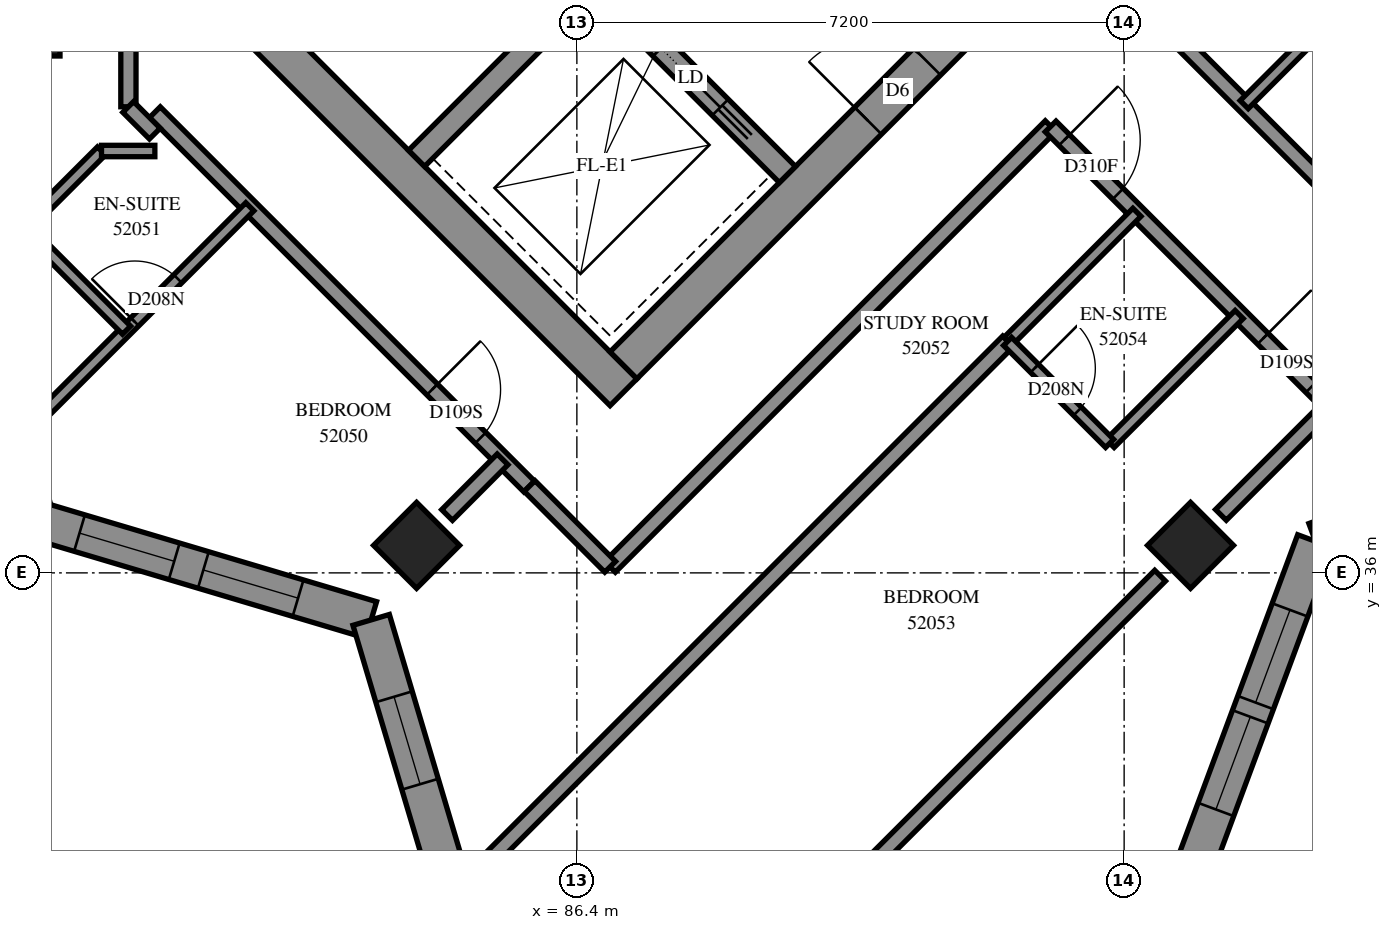
"""IFC4 building model, lengths in metres.
Left out: names, types, materials, properties, quantities, classifications, styles, units other than length and angle.
Written with IfcOpenShell. Run it as: python <this file> out.ifc"""

import sys

from ifc_helpers import new_model, si_unit, direction, frame, frame_2d, origin, origin_2d, place, context, subcontext, project, spatial, polyline, rectangle, outline, extrude, element, fill, save


model = new_model("IFC4")
c1 = context("Model", 3, precision=1e-05, world=origin(), true_north=direction((0.0, 1.0)))
c2 = subcontext(c1, "Body", "Model", "MODEL_VIEW")
j1 = project(units=[si_unit("LENGTHUNIT", "METRE"), si_unit("PLANEANGLEUNIT", "RADIAN")], contexts=[c1])
p1 = place(None, origin())
s1 = spatial("IfcSite", under=j1, at=p1, CompositionType="ELEMENT")
p2 = place(p1, origin())
s2 = spatial("IfcBuilding", under=s1, at=p2, CompositionType="ELEMENT")
p3 = place(p2, frame((0.0, 0.0, 193.0)))
s3 = spatial("IfcBuildingStorey", under=s2, at=p3, CompositionType="ELEMENT", Elevation=193.0)
for number, where, z_axis, x_axis in (
    (1, (79.2, 43.2, 0.0), (0.0, 0.0, 1.0), (1.0, 0.0, 0.0)),
    (2, (84.291, 36.362, 0.0), (0.0, 0.0, 1.0), (0.707, -0.707, 0.0)),
    (3, (94.474, 36.362, 0.0), (0.0, 0.0, 1.0), (0.707, -0.707, 0.0)),
):
    element("IfcColumn", number, at=place(p3, frame(where, z_axis=z_axis, x_axis=x_axis)), inside=s3, PredefinedType="COLUMN", context=c2, shape_type="SweptSolid", body=[
        extrude(rectangle(XDim=0.8, YDim=0.8, at=origin_2d()), origin(), (0.0, 0.0, 1.0), 3.1),
    ])
p4 = place(p3, frame((76.124, 49.267, -0.3), z_axis=(0.0, 0.0, 1.0), x_axis=(0.7071067812, -0.7071067812, 0.0)))
e4 = element("IfcWall", 4, at=p4, inside=s3, PredefinedType="SHEAR", context=c2, shape_type="SweptSolid", body=[
    extrude(rectangle(XDim=15.4, YDim=0.5, at=frame_2d((7.7, 0.0))), origin(), (0.0, 0.0, 1.0), 2.7),
])
p5 = place(p3, frame((87.013, 38.731, -0.3), z_axis=(0.0, 0.0, 1.0), x_axis=(0.7071067812, 0.7071067812, 0.0)))
e5 = element("IfcWall", 5, at=p5, inside=s3, PredefinedType="SHEAR", context=c2, shape_type="SweptSolid", body=[
    extrude(rectangle(XDim=14.4, YDim=0.5, at=frame_2d((7.2, 0.0))), origin(), (0.0, 0.0, 1.0), 2.7),
])
p6 = place(p5, frame((4.55, 0.0, 0.3)))
e6 = element("IfcOpeningElement", 6, at=p6, cuts=e5, PredefinedType="OPENING", context=c2, shape_type="SweptSolid", body=[
    extrude(rectangle(XDim=1.1, YDim=2.1, at=frame_2d((0.55, 1.05))), frame((0.0, 0.26, 0.0), z_axis=(0.0, -1.0, 0.0), x_axis=(1.0, 0.0, 0.0)), (0.0, 0.0, 1.0), 0.52),
])
p7 = place(p5, frame((11.35, 0.0, 0.3)))
e7 = element("IfcOpeningElement", 7, at=p7, cuts=e5, PredefinedType="OPENING", context=c2, shape_type="SweptSolid", body=[
    extrude(rectangle(XDim=1.1, YDim=2.1, at=frame_2d((0.55, 1.05))), frame((0.0, 0.26, 0.0), z_axis=(0.0, -1.0, 0.0), x_axis=(1.0, 0.0, 0.0)), (0.0, 0.0, 1.0), 0.52),
])
p8 = place(p3, frame((84.291, 41.453, 0.0), z_axis=(0.0, 0.0, 1.0), x_axis=(0.7071067812, 0.7071067812, 0.0)))
e8 = element("IfcWall", 8, at=p8, inside=s3, PredefinedType="SOLIDWALL", context=c2, shape_type="SweptSolid", body=[
    extrude(rectangle(XDim=3.3, YDim=0.3, at=frame_2d((1.65, 0.0))), origin(), (0.0, 0.0, 1.0), 3.1),
])
p9 = place(p3, frame((78.988, 51.423, 0.0), z_axis=(0.0, 0.0, 1.0), x_axis=(0.7071067812, -0.7071067812, 0.0)))
e9 = element("IfcWall", 9, at=p9, inside=s3, PredefinedType="SOLIDWALL", context=c2, shape_type="SweptSolid", body=[
    extrude(rectangle(XDim=14.4, YDim=0.3, at=frame_2d((7.2, 0.0))), origin(), (0.0, 0.0, 1.0), 3.1),
])
p10 = place(p9, frame((1.35, 0.0, 0.0)))
e10 = element("IfcOpeningElement", 10, at=p10, cuts=e9, PredefinedType="OPENING", context=c2, shape_type="SweptSolid", body=[
    extrude(rectangle(XDim=0.9, YDim=2.1, at=frame_2d((0.45, 1.05))), frame((0.0, 0.16, 0.0), z_axis=(0.0, -1.0, 0.0), x_axis=(1.0, 0.0, 0.0)), (0.0, 0.0, 1.0), 0.32),
])
p11 = place(p9, frame((4.95, 0.0, 0.0)))
e11 = element("IfcOpeningElement", 11, at=p11, cuts=e9, PredefinedType="OPENING", context=c2, shape_type="SweptSolid", body=[
    extrude(rectangle(XDim=0.9, YDim=2.1, at=frame_2d((0.45, 1.05))), frame((0.0, 0.16, 0.0), z_axis=(0.0, -1.0, 0.0), x_axis=(1.0, 0.0, 0.0)), (0.0, 0.0, 1.0), 0.32),
])
p12 = place(p9, frame((8.55, 0.0, 0.0)))
e12 = element("IfcOpeningElement", 12, at=p12, cuts=e9, PredefinedType="OPENING", context=c2, shape_type="SweptSolid", body=[
    extrude(rectangle(XDim=0.9, YDim=2.1, at=frame_2d((0.45, 1.05))), frame((0.0, 0.16, 0.0), z_axis=(0.0, -1.0, 0.0), x_axis=(1.0, 0.0, 0.0)), (0.0, 0.0, 1.0), 0.32),
])
p13 = place(p9, frame((12.05, 0.0, 0.0)))
e13 = element("IfcOpeningElement", 13, at=p13, cuts=e9, PredefinedType="OPENING", context=c2, shape_type="SweptSolid", body=[
    extrude(rectangle(XDim=1.1, YDim=2.1, at=frame_2d((0.55, 1.05))), frame((0.0, 0.16, 0.0), z_axis=(0.0, -1.0, 0.0), x_axis=(1.0, 0.0, 0.0)), (0.0, 0.0, 1.0), 0.32),
])
p14 = place(p3, frame((94.281, 31.47, 0.0), z_axis=(0.0, 0.0, 1.0), x_axis=(0.3481903374, 0.9374238577, 0.0)))
e14 = element("IfcWall", 14, at=p14, inside=s3, PredefinedType="SOLIDWALL", context=c2, shape_type="SweptSolid", body=[
    extrude(outline(polyline([(-0.12, -0.25), (5.16, -0.25), (5.39, 0.25), (0.12, 0.25), (-0.12, -0.25)])), origin(), (0.0, 0.0, 1.0), 3.1),
])
p15 = place(p14, frame((1.512, 0.0, 0.45)))
e15 = element("IfcOpeningElement", 15, at=p15, cuts=e14, PredefinedType="OPENING", context=c2, shape_type="SweptSolid", body=[
    extrude(rectangle(XDim=1.3, YDim=2.5, at=frame_2d((0.65, 1.25))), frame((0.0, 0.26, 0.0), z_axis=(0.0, -1.0, 0.0), x_axis=(1.0, 0.0, 0.0)), (0.0, 0.0, 1.0), 0.52),
])
p16 = place(p14, frame((3.012, 0.0, 0.45)))
e16 = element("IfcOpeningElement", 16, at=p16, cuts=e14, PredefinedType="OPENING", context=c2, shape_type="SweptSolid", body=[
    extrude(rectangle(XDim=1.3, YDim=2.5, at=frame_2d((0.65, 1.25))), frame((0.0, 0.26, 0.0), z_axis=(0.0, -1.0, 0.0), x_axis=(1.0, 0.0, 0.0)), (0.0, 0.0, 1.0), 0.52),
])
p17 = place(p3, frame((96.118, 36.415, 0.0), z_axis=(0.0, 0.0, 1.0), x_axis=(0.9374238577, 0.3481903374, 0.0)))
e17 = element("IfcWall", 17, at=p17, inside=s3, PredefinedType="SOLIDWALL", context=c2, shape_type="SweptSolid", body=[
    extrude(outline(polyline([(0.115, -0.25), (5.395, -0.25), (5.155, 0.25), (-0.115, 0.25), (0.115, -0.25)])), origin(), (0.0, 0.0, 1.0), 3.1),
])
p18 = place(p17, frame((1.655, 0.0, 0.45)))
e18 = element("IfcOpeningElement", 18, at=p18, cuts=e17, PredefinedType="OPENING", context=c2, shape_type="SweptSolid", body=[
    extrude(rectangle(XDim=1.3, YDim=2.5, at=frame_2d((0.65, 1.25))), frame((0.0, 0.26, 0.0), z_axis=(0.0, -1.0, 0.0), x_axis=(1.0, 0.0, 0.0)), (0.0, 0.0, 1.0), 0.52),
])
p19 = place(p17, frame((3.155, 0.0, 0.45)))
e19 = element("IfcOpeningElement", 19, at=p19, cuts=e17, PredefinedType="OPENING", context=c2, shape_type="SweptSolid", body=[
    extrude(rectangle(XDim=1.3, YDim=2.5, at=frame_2d((0.65, 1.25))), frame((0.0, 0.26, 0.0), z_axis=(0.0, -1.0, 0.0), x_axis=(1.0, 0.0, 0.0)), (0.0, 0.0, 1.0), 0.52),
])
p20 = place(p3, frame((79.27, 36.698, 0.0), z_axis=(0.0, 0.0, 1.0), x_axis=(0.958448341, -0.2852661522, 0.0)))
e20 = element("IfcWall", 20, at=p20, inside=s3, PredefinedType="SOLIDWALL", context=c2, shape_type="SweptSolid", body=[
    extrude(outline(polyline([(-0.141, -0.25), (4.48, -0.25), (4.751, 0.25), (0.141, 0.25), (-0.141, -0.25)])), origin(), (0.0, 0.0, 1.0), 3.1),
])
p21 = place(p20, frame((0.612, 0.0, 0.45)))
e21 = element("IfcOpeningElement", 21, at=p21, cuts=e20, PredefinedType="OPENING", context=c2, shape_type="SweptSolid", body=[
    extrude(rectangle(XDim=1.3, YDim=2.5, at=frame_2d((0.65, 1.25))), frame((0.0, 0.26, 0.0), z_axis=(0.0, -1.0, 0.0), x_axis=(1.0, 0.0, 0.0)), (0.0, 0.0, 1.0), 0.52),
])
p22 = place(p20, frame((2.312, 0.0, 0.45)))
e22 = element("IfcOpeningElement", 22, at=p22, cuts=e20, PredefinedType="OPENING", context=c2, shape_type="SweptSolid", body=[
    extrude(rectangle(XDim=1.3, YDim=2.5, at=frame_2d((0.65, 1.25))), frame((0.0, 0.26, 0.0), z_axis=(0.0, -1.0, 0.0), x_axis=(1.0, 0.0, 0.0)), (0.0, 0.0, 1.0), 0.52),
])
p23 = place(p3, frame((83.694, 35.381, 0.0), z_axis=(0.0, 0.0, 1.0), x_axis=(0.2852661522, -0.958448341, 0.0)))
e23 = element("IfcWall", 23, at=p23, inside=s3, PredefinedType="SOLIDWALL", context=c2, shape_type="SweptSolid", body=[
    extrude(outline(polyline([(0.135, -0.25), (4.757, -0.25), (4.474, 0.25), (-0.135, 0.25), (0.135, -0.25)])), origin(), (0.0, 0.0, 1.0), 3.1),
])
p24 = place(p23, frame((1.055, 0.0, 0.45)))
e24 = element("IfcOpeningElement", 24, at=p24, cuts=e23, PredefinedType="OPENING", context=c2, shape_type="SweptSolid", body=[
    extrude(rectangle(XDim=1.2, YDim=2.5, at=frame_2d((0.6, 1.25))), frame((0.0, 0.26, 0.0), z_axis=(0.0, -1.0, 0.0), x_axis=(1.0, 0.0, 0.0)), (0.0, 0.0, 1.0), 0.52),
])
p25 = place(p3, frame((84.976, 31.95, 0.0), z_axis=(0.0, 0.0, 1.0), x_axis=(0.7072313319, 0.7069822085, 0.0)))
e25 = element("IfcWall", 25, at=p25, inside=s3, PredefinedType="PARTITIONING", context=c2, shape_type="SweptSolid", body=[
    extrude(rectangle(XDim=10.035, YDim=0.2, at=frame_2d((5.018, 0.0))), origin(), (0.0, 0.0, 1.0), 3.1),
])
p26 = place(p3, frame((86.835, 36.079, 0.0), z_axis=(0.0, 0.0, 1.0), x_axis=(0.7071067812, 0.7071067812, 0.0)))
e26 = element("IfcWall", 26, at=p26, inside=s3, PredefinedType="PARTITIONING", context=c2, shape_type="SweptSolid", body=[
    extrude(rectangle(XDim=8.2, YDim=0.2, at=frame_2d((4.1, 0.0))), origin(), (0.0, 0.0, 1.0), 3.1),
])
p27 = place(p3, frame((80.849, 42.061, 0.0), z_axis=(0.0, 0.0, 1.0), x_axis=(0.7071067812, -0.7071067812, 0.0)))
e27 = element("IfcWall", 27, at=p27, inside=s3, PredefinedType="PARTITIONING", context=c2, shape_type="SweptSolid", body=[
    extrude(rectangle(XDim=6.964, YDim=0.2, at=frame_2d((3.482, 0.0))), origin(), (0.0, 0.0, 1.0), 3.1),
])
p28 = place(p27, frame((5.159, 0.0, 0.0)))
e28 = element("IfcOpeningElement", 28, at=p28, cuts=e27, PredefinedType="OPENING", context=c2, shape_type="SweptSolid", body=[
    extrude(rectangle(XDim=0.9, YDim=2.1, at=frame_2d((0.45, 1.05))), frame((0.0, 0.11, 0.0), z_axis=(0.0, -1.0, 0.0), x_axis=(1.0, 0.0, 0.0)), (0.0, 0.0, 1.0), 0.22),
])
p29 = place(p3, frame((89.781, 31.671, 0.0), z_axis=(0.0, 0.0, 1.0), x_axis=(0.7071067812, 0.7071067812, 0.0)))
e29 = element("IfcWall", 29, at=p29, inside=s3, PredefinedType="PARTITIONING", context=c2, shape_type="SweptSolid", body=[
    extrude(rectangle(XDim=6.07, YDim=0.2, at=frame_2d((3.035, 0.0))), origin(), (0.0, 0.0, 1.0), 2.6),
])
p30 = place(p3, frame((94.047, 43.287, 0.0), z_axis=(0.0, 0.0, 1.0), x_axis=(0.7071067812, -0.7071067812, 0.0)))
e30 = element("IfcWall", 30, at=p30, inside=s3, PredefinedType="PARTITIONING", context=c2, shape_type="SweptSolid", body=[
    extrude(rectangle(XDim=5.199, YDim=0.2, at=frame_2d((2.599, 0.0))), origin(), (0.0, 0.0, 1.0), 3.1),
])
p31 = place(p30, frame((3.898, 0.0, 0.0)))
e31 = element("IfcOpeningElement", 31, at=p31, cuts=e30, PredefinedType="OPENING", context=c2, shape_type="SweptSolid", body=[
    extrude(rectangle(XDim=0.9, YDim=2.1, at=frame_2d((0.45, 1.05))), frame((0.0, 0.11, 0.0), z_axis=(0.0, -1.0, 0.0), x_axis=(1.0, 0.0, 0.0)), (0.0, 0.0, 1.0), 0.22),
])
p32 = place(p3, frame((92.633, 41.873, 0.0), z_axis=(0.0, 0.0, 1.0), x_axis=(0.7071067812, -0.7071067812, 0.0)))
e32 = element("IfcWall", 32, at=p32, inside=s3, PredefinedType="PARTITIONING", context=c2, shape_type="SweptSolid", body=[
    extrude(rectangle(XDim=5.199, YDim=0.2, at=frame_2d((2.599, 0.0))), origin(), (0.0, 0.0, 1.0), 3.1),
])
p33 = place(p32, frame((0.253, 0.0, 0.0)))
e33 = element("IfcOpeningElement", 33, at=p33, cuts=e32, PredefinedType="OPENING", context=c2, shape_type="SweptSolid", body=[
    extrude(rectangle(XDim=1.0, YDim=2.1, at=frame_2d((0.5, 1.05))), frame((0.0, 0.11, 0.0), z_axis=(0.0, -1.0, 0.0), x_axis=(1.0, 0.0, 0.0)), (0.0, 0.0, 1.0), 0.22),
])
p34 = place(p32, frame((3.948, 0.0, 0.0)))
e34 = element("IfcOpeningElement", 34, at=p34, cuts=e32, PredefinedType="OPENING", context=c2, shape_type="SweptSolid", body=[
    extrude(rectangle(XDim=0.9, YDim=2.1, at=frame_2d((0.45, 1.05))), frame((0.0, 0.11, 0.0), z_axis=(0.0, -1.0, 0.0), x_axis=(1.0, 0.0, 0.0)), (0.0, 0.0, 1.0), 0.22),
])
p35 = place(p3, frame((79.211, 37.93, 0.0), z_axis=(0.0, 0.0, 1.0), x_axis=(0.7070945332, 0.707119029, 0.0)))
e35 = element("IfcWall", 35, at=p35, inside=s3, PredefinedType="PARTITIONING", context=c2, shape_type="SweptSolid", body=[
    extrude(rectangle(XDim=4.082, YDim=0.15, at=frame_2d((2.041, 0.0))), origin(), (0.0, 0.0, 1.0), 3.1),
])
p36 = place(p35, frame((1.942, 0.0, 0.0)))
e36 = element("IfcOpeningElement", 36, at=p36, cuts=e35, PredefinedType="OPENING", context=c2, shape_type="SweptSolid", body=[
    extrude(rectangle(XDim=0.8, YDim=2.1, at=frame_2d((0.4, 1.05))), frame((0.0, 0.085, 0.0), z_axis=(0.0, -1.0, 0.0), x_axis=(1.0, 0.0, 0.0)), (0.0, 0.0, 1.0), 0.17),
])
p37 = place(p3, frame((78.368, 41.303, 0.0), z_axis=(0.0, 0.0, 1.0), x_axis=(0.7065867451, -0.7076264351, 0.0)))
e37 = element("IfcWall", 37, at=p37, inside=s3, PredefinedType="PARTITIONING", context=c2, shape_type="SweptSolid", body=[
    extrude(rectangle(XDim=2.982, YDim=0.15, at=frame_2d((1.491, 0.0))), origin(), (0.0, 0.0, 1.0), 3.1),
])
p38 = place(p3, frame((95.179, 42.161, 0.0), z_axis=(0.0, 0.0, 1.0), x_axis=(0.7071067812, 0.7071067812, 0.0)))
e38 = element("IfcWall", 38, at=p38, inside=s3, PredefinedType="PARTITIONING", context=c2, shape_type="SweptSolid", body=[
    extrude(rectangle(XDim=2.401, YDim=0.15, at=frame_2d((1.201, 0.0))), origin(), (0.0, 0.0, 1.0), 3.1),
])
for number, where, z_axis, x_axis in (
    (39, (92.072, 39.046, 0.0), (0.0, 0.0, 1.0), (0.707, 0.708, 0.0)),
    (40, (93.415, 37.703, 0.0), (0.0, 0.0, 1.0), (0.708, 0.707, 0.0)),
):
    element("IfcWall", number, at=place(p3, frame(where, z_axis=z_axis, x_axis=x_axis)), inside=s3, PredefinedType="PARTITIONING", context=c2, shape_type="SweptSolid", body=[
        extrude(rectangle(XDim=2.4, YDim=0.15, at=frame_2d((1.2, 0.0))), origin(), (0.0, 0.0, 1.0), 3.1),
    ])
p39 = place(p3, frame((80.5, 42.132, 0.0), z_axis=(0.0, 0.0, 1.0), x_axis=(0.0, 1.0, 0.0)))
e41 = element("IfcWall", 41, at=p39, inside=s3, PredefinedType="PARTITIONING", context=c2, shape_type="SweptSolid", body=[
    extrude(rectangle(XDim=2.292, YDim=0.2, at=frame_2d((1.146, 0.0))), origin(), (0.0, 0.0, 1.0), 3.1),
])
p40 = place(p3, frame((78.661, 40.067, 0.0), z_axis=(0.0, 0.0, 1.0), x_axis=(0.7070829621, 0.7071305995, 0.0)))
e42 = element("IfcWall", 42, at=p40, inside=s3, PredefinedType="PARTITIONING", context=c2, shape_type="SweptSolid", body=[
    extrude(rectangle(XDim=2.099, YDim=0.15, at=frame_2d((1.05, 0.0))), origin(), (0.0, 0.0, 1.0), 3.1),
])
p41 = place(p3, frame((94.873, 36.763, 0.0), z_axis=(0.0, 0.0, 1.0), x_axis=(0.7071067812, 0.7071067812, 0.0)))
e43 = element("IfcWall", 43, at=p41, inside=s3, PredefinedType="PARTITIONING", context=c2, shape_type="SweptSolid", body=[
    extrude(rectangle(XDim=2.034, YDim=0.2, at=frame_2d((1.017, 0.0))), origin(), (0.0, 0.0, 1.0), 2.6),
])
p42 = place(p3, frame((92.067, 39.045, 0.0), z_axis=(0.0, 0.0, 1.0), x_axis=(0.7071067812, -0.7071067812, 0.0)))
e44 = element("IfcWall", 44, at=p42, inside=s3, PredefinedType="PARTITIONING", context=c2, shape_type="SweptSolid", body=[
    extrude(rectangle(XDim=1.898, YDim=0.15, at=frame_2d((0.949, 0.0))), origin(), (0.0, 0.0, 1.0), 3.1),
])
p43 = place(p42, frame((0.501, 0.0, 0.0)))
e45 = element("IfcOpeningElement", 45, at=p43, cuts=e44, PredefinedType="OPENING", context=c2, shape_type="SweptSolid", body=[
    extrude(rectangle(XDim=0.8, YDim=2.1, at=frame_2d((0.4, 1.05))), frame((0.0, 0.085, 0.0), z_axis=(0.0, -1.0, 0.0), x_axis=(1.0, 0.0, 0.0)), (0.0, 0.0, 1.0), 0.17),
])
p44 = place(p3, frame((85.778, 37.142, 0.0), z_axis=(0.0, 0.0, 1.0), x_axis=(0.7064400143, -0.70777292, 0.0)))
e46 = element("IfcWall", 46, at=p44, inside=s3, PredefinedType="PARTITIONING", context=c2, shape_type="SweptSolid", body=[
    extrude(rectangle(XDim=1.5, YDim=0.2, at=frame_2d((0.75, 0.0))), origin(), (0.0, 0.0, 1.0), 3.1),
])
p45 = place(p3, frame((84.693, 36.761, 0.0), z_axis=(0.0, 0.0, 1.0), x_axis=(0.7061388061, 0.708073433, 0.0)))
e47 = element("IfcWall", 47, at=p45, inside=s3, PredefinedType="PARTITIONING", context=c2, shape_type="SweptSolid", body=[
    extrude(rectangle(XDim=1.034, YDim=0.2, at=frame_2d((0.517, 0.0))), origin(), (0.0, 0.0, 1.0), 3.1),
])
p46 = place(p3, frame((80.146, 41.55, 0.0), z_axis=(0.0, 0.0, 1.0), x_axis=(1.0, 0.0, 0.0)))
e48 = element("IfcWall", 48, at=p46, inside=s3, PredefinedType="PARTITIONING", context=c2, shape_type="SweptSolid", body=[
    extrude(rectangle(XDim=0.702, YDim=0.15, at=frame_2d((0.351, 0.0))), origin(), (0.0, 0.0, 1.0), 3.1),
])
p47 = place(p3, frame((80.497, 42.129, 0.0), z_axis=(0.0, 0.0, 1.0), x_axis=(0.7071067812, -0.7071067812, 0.0)))
e49 = element("IfcWall", 49, at=p47, inside=s3, PredefinedType="PARTITIONING", context=c2, shape_type="SweptSolid", body=[
    extrude(rectangle(XDim=0.495, YDim=0.2, at=frame_2d((0.247, 0.0))), origin(), (0.0, 0.0, 1.0), 3.1),
])
p48 = place(p15, origin())
e50 = element("IfcWindow", 50, at=p48, inside=s3, PartitioningType="SINGLE_PANEL", PredefinedType="WINDOW", context=c2, shape_type="SweptSolid", body=[
    extrude(rectangle(XDim=1.3, YDim=2.5, at=frame_2d((0.65, 1.25))), frame((0.0, 0.18, 0.0), z_axis=(0.0, -1.0, 0.0), x_axis=(1.0, 0.0, 0.0)), (0.0, 0.0, 1.0), 0.06),
])
fill(e15, e50)
p49 = place(p16, origin())
e51 = element("IfcWindow", 51, at=p49, inside=s3, PartitioningType="SINGLE_PANEL", PredefinedType="WINDOW", context=c2, shape_type="SweptSolid", body=[
    extrude(rectangle(XDim=1.3, YDim=2.5, at=frame_2d((0.65, 1.25))), frame((0.0, 0.18, 0.0), z_axis=(0.0, -1.0, 0.0), x_axis=(1.0, 0.0, 0.0)), (0.0, 0.0, 1.0), 0.06),
])
fill(e16, e51)
p50 = place(p21, origin())
e52 = element("IfcWindow", 52, at=p50, inside=s3, PartitioningType="SINGLE_PANEL", PredefinedType="WINDOW", context=c2, shape_type="SweptSolid", body=[
    extrude(rectangle(XDim=1.3, YDim=2.5, at=frame_2d((0.65, 1.25))), frame((0.0, 0.18, 0.0), z_axis=(0.0, -1.0, 0.0), x_axis=(1.0, 0.0, 0.0)), (0.0, 0.0, 1.0), 0.06),
])
fill(e21, e52)
p51 = place(p22, origin())
e53 = element("IfcWindow", 53, at=p51, inside=s3, PartitioningType="SINGLE_PANEL", PredefinedType="WINDOW", context=c2, shape_type="SweptSolid", body=[
    extrude(rectangle(XDim=1.3, YDim=2.5, at=frame_2d((0.65, 1.25))), frame((0.0, 0.18, 0.0), z_axis=(0.0, -1.0, 0.0), x_axis=(1.0, 0.0, 0.0)), (0.0, 0.0, 1.0), 0.06),
])
fill(e22, e53)
p52 = place(p24, origin())
e54 = element("IfcWindow", 54, at=p52, inside=s3, PartitioningType="SINGLE_PANEL", PredefinedType="WINDOW", context=c2, shape_type="SweptSolid", body=[
    extrude(rectangle(XDim=1.2, YDim=2.5, at=frame_2d((0.6, 1.25))), frame((0.0, 0.18, 0.0), z_axis=(0.0, -1.0, 0.0), x_axis=(1.0, 0.0, 0.0)), (0.0, 0.0, 1.0), 0.06),
])
fill(e24, e54)
p53 = place(p6, origin())
e55 = element("IfcDoor", 55, at=p53, inside=s3, OperationType="DOUBLE_DOOR_SINGLE_SWING", PredefinedType="DOOR", context=c2, shape_type="SweptSolid", body=[
    extrude(rectangle(XDim=1.1, YDim=2.1, at=frame_2d((0.55, 1.05))), frame((0.0, 0.025, 0.0), z_axis=(0.0, -1.0, 0.0), x_axis=(1.0, 0.0, 0.0)), (0.0, 0.0, 1.0), 0.05),
])
fill(e6, e55)
p54 = place(p13, origin())
e56 = element("IfcDoor", 56, at=p54, inside=s3, OperationType="SLIDING_TO_RIGHT", PredefinedType="DOOR", context=c2, shape_type="SweptSolid", body=[
    extrude(rectangle(XDim=1.1, YDim=2.1, at=frame_2d((0.55, 1.05))), frame((0.0, 0.025, 0.0), z_axis=(0.0, -1.0, 0.0), x_axis=(1.0, 0.0, 0.0)), (0.0, 0.0, 1.0), 0.05),
])
fill(e13, e56)
p55 = place(p28, origin())
e57 = element("IfcDoor", 57, at=p55, inside=s3, OperationType="SINGLE_SWING_RIGHT", PredefinedType="DOOR", context=c2, shape_type="SweptSolid", body=[
    extrude(rectangle(XDim=0.9, YDim=2.1, at=frame_2d((0.45, 1.05))), frame((0.0, 0.025, 0.0), z_axis=(0.0, -1.0, 0.0), x_axis=(1.0, 0.0, 0.0)), (0.0, 0.0, 1.0), 0.05),
])
fill(e28, e57)
p56 = place(p36, origin())
e58 = element("IfcDoor", 58, at=p56, inside=s3, OperationType="SINGLE_SWING_RIGHT", PredefinedType="DOOR", context=c2, shape_type="SweptSolid", body=[
    extrude(rectangle(XDim=0.8, YDim=2.1, at=frame_2d((0.4, 1.05))), frame((0.0, 0.025, 0.0), z_axis=(0.0, -1.0, 0.0), x_axis=(1.0, 0.0, 0.0)), (0.0, 0.0, 1.0), 0.05),
])
fill(e36, e58)
p57 = place(p33, origin())
e59 = element("IfcDoor", 59, at=p57, inside=s3, OperationType="SINGLE_SWING_RIGHT", PredefinedType="DOOR", context=c2, shape_type="SweptSolid", body=[
    extrude(rectangle(XDim=1.0, YDim=2.1, at=frame_2d((0.5, 1.05))), frame((0.0, 0.025, 0.0), z_axis=(0.0, -1.0, 0.0), x_axis=(1.0, 0.0, 0.0)), (0.0, 0.0, 1.0), 0.05),
])
fill(e33, e59)
p58 = place(p34, origin())
e60 = element("IfcDoor", 60, at=p58, inside=s3, OperationType="SINGLE_SWING_LEFT", PredefinedType="DOOR", context=c2, shape_type="SweptSolid", body=[
    extrude(rectangle(XDim=0.9, YDim=2.1, at=frame_2d((0.45, 1.05))), frame((0.0, 0.025, 0.0), z_axis=(0.0, -1.0, 0.0), x_axis=(1.0, 0.0, 0.0)), (0.0, 0.0, 1.0), 0.05),
])
fill(e34, e60)
p59 = place(p43, origin())
e61 = element("IfcDoor", 61, at=p59, inside=s3, OperationType="SINGLE_SWING_RIGHT", PredefinedType="DOOR", context=c2, shape_type="SweptSolid", body=[
    extrude(rectangle(XDim=0.8, YDim=2.1, at=frame_2d((0.4, 1.05))), frame((0.0, 0.025, 0.0), z_axis=(0.0, -1.0, 0.0), x_axis=(1.0, 0.0, 0.0)), (0.0, 0.0, 1.0), 0.05),
])
fill(e45, e61)
save(model, sys.argv[1])
